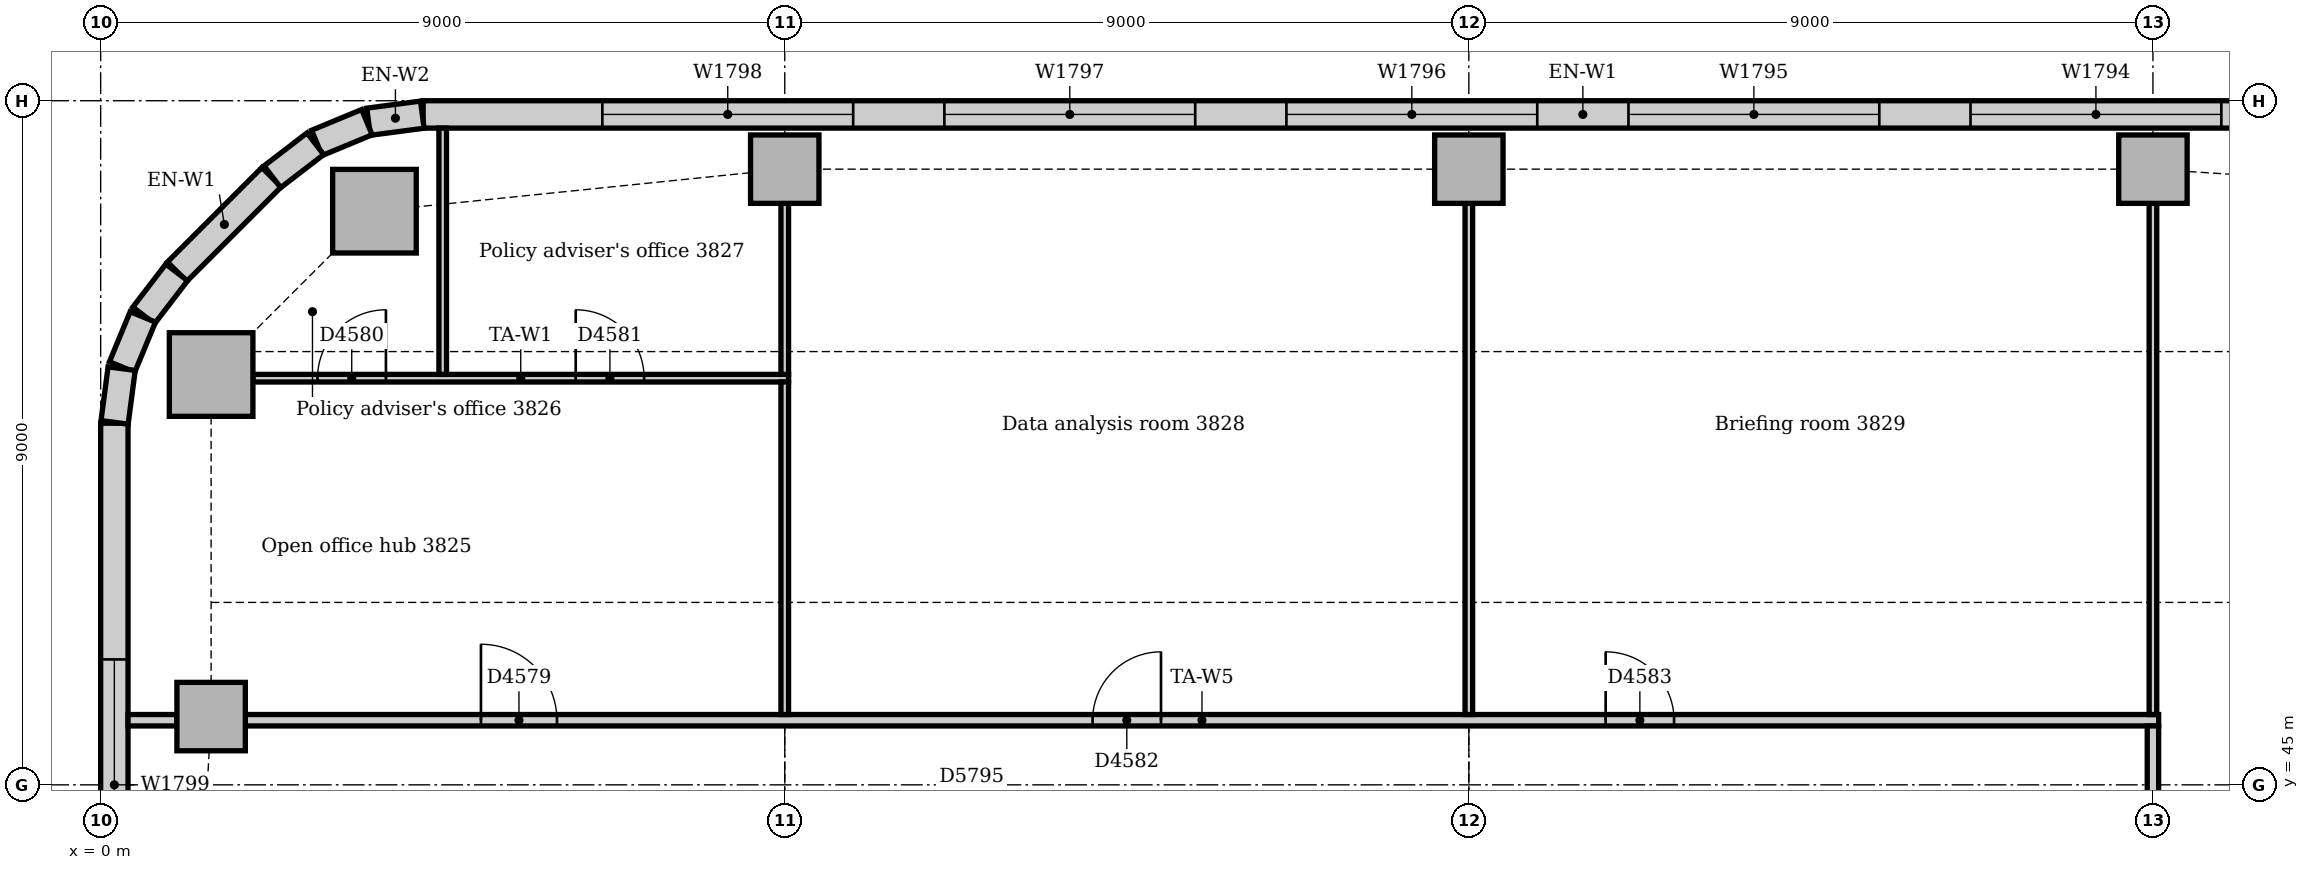
"""IFC4 building model, lengths in metres.
Left out: names, types, materials, properties, quantities, classifications, styles, units other than length and angle.
Written with IfcOpenShell. Run it as: python <this file> out.ifc"""

import sys

from ifc_helpers import new_model, si_unit, direction, frame, frame_2d, origin, origin_2d, place, context, subcontext, project, spatial, rectangle, extrude, element, fill, save


model = new_model("IFC4")
c1 = context("Model", 3, precision=1e-05, world=origin(), true_north=direction((0.0, 1.0)))
c2 = subcontext(c1, "Body", "Model", "MODEL_VIEW")
j1 = project(units=[si_unit("LENGTHUNIT", "METRE"), si_unit("PLANEANGLEUNIT", "RADIAN")], contexts=[c1])
p1 = place(None, origin())
s1 = spatial("IfcSite", under=j1, at=p1, CompositionType="ELEMENT")
p2 = place(p1, origin())
s2 = spatial("IfcBuilding", under=s1, at=p2, CompositionType="ELEMENT")
p3 = place(p2, frame((0.0, 0.0, 161.0)))
s3 = spatial("IfcBuildingStorey", under=s2, at=p3, CompositionType="ELEMENT", Elevation=161.0)
for number, where, z_axis, x_axis in (
    (1, (3.602, 52.547, 0.0), (0.0, 0.0, 1.0), (1.0, 0.0, 0.0)),
    (2, (1.453, 50.398, 0.0), (0.0, 0.0, 1.0), (1.0, 0.0, 0.0)),
):
    element("IfcColumn", number, at=place(p3, frame(where, z_axis=z_axis, x_axis=x_axis)), inside=s3, PredefinedType="COLUMN", context=c2, shape_type="SweptSolid", body=[
        extrude(rectangle(XDim=1.1, YDim=1.1, at=origin_2d()), origin(), (0.0, 0.0, 1.0), 3.85),
    ])
for number, where, z_axis, x_axis in (
    (3, (9.0, 53.1, 0.0), (0.0, 0.0, 1.0), (1.0, 0.0, 0.0)),
    (4, (18.0, 53.1, 0.0), (0.0, 0.0, 1.0), (1.0, 0.0, 0.0)),
    (5, (27.0, 53.1, 0.0), (0.0, 0.0, 1.0), (1.0, 0.0, 0.0)),
    (6, (1.453, 45.898, 0.0), (0.0, 0.0, 1.0), (1.0, 0.0, 0.0)),
):
    element("IfcColumn", number, at=place(p3, frame(where, z_axis=z_axis, x_axis=x_axis)), inside=s3, PredefinedType="COLUMN", context=c2, shape_type="SweptSolid", body=[
        extrude(rectangle(XDim=0.9, YDim=0.9, at=origin_2d()), origin(), (0.0, 0.0, 1.0), 3.85),
    ])
p4 = place(p3, frame((34.757, 53.82, 0.0), z_axis=(0.0, 0.0, 1.0), x_axis=(-1.0, 0.0, 0.0)))
e7 = element("IfcWall", 7, at=p4, inside=s3, PredefinedType="STANDARD", context=c2, shape_type="SweptSolid", body=[
    extrude(rectangle(XDim=30.515, YDim=0.36, at=frame_2d((15.257, 0.0))), origin(), (0.0, 0.0, 1.0), 3.85),
])
p5 = place(p4, frame((2.357, 0.0, 0.9)))
e8 = element("IfcOpeningElement", 8, at=p5, cuts=e7, PredefinedType="OPENING", context=c2, shape_type="SweptSolid", body=[
    extrude(rectangle(XDim=3.3, YDim=1.6, at=frame_2d((1.65, 0.8))), frame((0.0, 0.19, 0.0), z_axis=(0.0, -1.0, 0.0), x_axis=(1.0, 0.0, 0.0)), (0.0, 0.0, 1.0), 0.38),
])
p6 = place(p4, frame((6.857, 0.0, 0.9)))
e9 = element("IfcOpeningElement", 9, at=p6, cuts=e7, PredefinedType="OPENING", context=c2, shape_type="SweptSolid", body=[
    extrude(rectangle(XDim=3.3, YDim=1.6, at=frame_2d((1.65, 0.8))), frame((0.0, 0.19, 0.0), z_axis=(0.0, -1.0, 0.0), x_axis=(1.0, 0.0, 0.0)), (0.0, 0.0, 1.0), 0.38),
])
p7 = place(p4, frame((11.357, 0.0, 0.9)))
e10 = element("IfcOpeningElement", 10, at=p7, cuts=e7, PredefinedType="OPENING", context=c2, shape_type="SweptSolid", body=[
    extrude(rectangle(XDim=3.3, YDim=1.6, at=frame_2d((1.65, 0.8))), frame((0.0, 0.19, 0.0), z_axis=(0.0, -1.0, 0.0), x_axis=(1.0, 0.0, 0.0)), (0.0, 0.0, 1.0), 0.38),
])
p8 = place(p4, frame((15.857, 0.0, 0.9)))
e11 = element("IfcOpeningElement", 11, at=p8, cuts=e7, PredefinedType="OPENING", context=c2, shape_type="SweptSolid", body=[
    extrude(rectangle(XDim=3.3, YDim=1.6, at=frame_2d((1.65, 0.8))), frame((0.0, 0.19, 0.0), z_axis=(0.0, -1.0, 0.0), x_axis=(1.0, 0.0, 0.0)), (0.0, 0.0, 1.0), 0.38),
])
p9 = place(p4, frame((20.357, 0.0, 0.9)))
e12 = element("IfcOpeningElement", 12, at=p9, cuts=e7, PredefinedType="OPENING", context=c2, shape_type="SweptSolid", body=[
    extrude(rectangle(XDim=3.3, YDim=1.6, at=frame_2d((1.65, 0.8))), frame((0.0, 0.19, 0.0), z_axis=(0.0, -1.0, 0.0), x_axis=(1.0, 0.0, 0.0)), (0.0, 0.0, 1.0), 0.38),
])
p10 = place(p4, frame((24.857, 0.0, 0.9)))
e13 = element("IfcOpeningElement", 13, at=p10, cuts=e7, PredefinedType="OPENING", context=c2, shape_type="SweptSolid", body=[
    extrude(rectangle(XDim=3.3, YDim=1.6, at=frame_2d((1.65, 0.8))), frame((0.0, 0.19, 0.0), z_axis=(0.0, -1.0, 0.0), x_axis=(1.0, 0.0, 0.0)), (0.0, 0.0, 1.0), 0.38),
])
p11 = place(p3, frame((2.249, 52.994, 0.0), z_axis=(0.0, 0.0, 1.0), x_axis=(-0.707106781187, -0.707106781187, 0.0)))
e14 = element("IfcWall", 14, at=p11, inside=s3, PredefinedType="STANDARD", context=c2, shape_type="SweptSolid", body=[
    extrude(rectangle(XDim=1.757, YDim=0.36, at=frame_2d((0.879, 0.0))), origin(), (0.0, 0.0, 1.0), 3.85),
])
p12 = place(p3, frame((0.18, 49.757, 0.0), z_axis=(0.0, 0.0, 1.0), x_axis=(0.0, -1.0, 0.0)))
e15 = element("IfcWall", 15, at=p12, inside=s3, PredefinedType="STANDARD", context=c2, shape_type="SweptSolid", body=[
    extrude(rectangle(XDim=7.757, YDim=0.36, at=frame_2d((3.879, 0.0))), origin(), (0.0, 0.0, 1.0), 3.85),
])
p13 = place(p12, frame((3.107, 0.0, 0.9)))
e16 = element("IfcOpeningElement", 16, at=p13, cuts=e15, PredefinedType="OPENING", context=c2, shape_type="SweptSolid", body=[
    extrude(rectangle(XDim=3.3, YDim=1.6, at=frame_2d((1.65, 0.8))), frame((0.0, 0.19, 0.0), z_axis=(0.0, -1.0, 0.0), x_axis=(1.0, 0.0, 0.0)), (0.0, 0.0, 1.0), 0.38),
])
for number, where, z_axis, x_axis in (
    (17, (4.231, 53.817, 0.0), (0.0, 0.0, 1.0), (-0.991, -0.131, 0.0)),
    (18, (3.503, 53.718, 0.0), (0.0, 0.0, 1.0), (-0.924, -0.383, 0.0)),
):
    element("IfcWall", number, at=place(p3, frame(where, z_axis=z_axis, x_axis=x_axis)), inside=s3, PredefinedType="STANDARD", context=c2, shape_type="SweptSolid", body=[
        extrude(rectangle(XDim=0.713, YDim=0.36, at=frame_2d((0.356, 0.0))), origin(), (0.0, 0.0, 1.0), 3.85),
    ])
for number, where, z_axis, x_axis in (
    (19, (2.825, 53.434, 0.0), (0.0, 0.0, 1.0), (-0.793, -0.609, 0.0)),
    (20, (1.0, 51.741, 0.0), (0.0, 0.0, 1.0), (-0.609, -0.793, 0.0)),
):
    element("IfcWall", number, at=place(p3, frame(where, z_axis=z_axis, x_axis=x_axis)), inside=s3, PredefinedType="STANDARD", context=c2, shape_type="SweptSolid", body=[
        extrude(rectangle(XDim=0.713, YDim=0.36, at=frame_2d((0.357, 0.0))), origin(), (0.0, 0.0, 1.0), 3.85),
    ])
for number, where, z_axis, x_axis in (
    (21, (0.555, 51.156, 0.0), (0.0, 0.0, 1.0), (-0.383, -0.924, 0.0)),
    (22, (0.276, 50.476, 0.0), (0.0, 0.0, 1.0), (-0.131, -0.991, 0.0)),
):
    element("IfcWall", number, at=place(p3, frame(where, z_axis=z_axis, x_axis=x_axis)), inside=s3, PredefinedType="STANDARD", context=c2, shape_type="SweptSolid", body=[
        extrude(rectangle(XDim=0.713, YDim=0.36, at=frame_2d((0.356, 0.0))), origin(), (0.0, 0.0, 1.0), 3.85),
    ])
p14 = place(p3, frame((1.903, 45.85, 0.0), z_axis=(0.0, 0.0, 1.0), x_axis=(1.0, 0.0, 0.0)))
e23 = element("IfcWall", 23, at=p14, inside=s3, PredefinedType="PARTITIONING", context=c2, shape_type="SweptSolid", body=[
    extrude(rectangle(XDim=25.172, YDim=0.15, at=frame_2d((12.586, 0.0))), origin(), (0.0, 0.0, 1.0), 3.85),
])
p15 = place(p14, frame((3.1, 0.0, 0.0)))
e24 = element("IfcOpeningElement", 24, at=p15, cuts=e23, PredefinedType="OPENING", context=c2, shape_type="SweptSolid", body=[
    extrude(rectangle(XDim=1.0, YDim=2.1, at=frame_2d((0.5, 1.05))), frame((0.0, 0.085, 0.0), z_axis=(0.0, -1.0, 0.0), x_axis=(1.0, 0.0, 0.0)), (0.0, 0.0, 1.0), 0.17),
])
p16 = place(p14, frame((11.147, 0.0, 0.0)))
e25 = element("IfcOpeningElement", 25, at=p16, cuts=e23, PredefinedType="OPENING", context=c2, shape_type="SweptSolid", body=[
    extrude(rectangle(XDim=0.9, YDim=2.1, at=frame_2d((0.45, 1.05))), frame((0.0, 0.085, 0.0), z_axis=(0.0, -1.0, 0.0), x_axis=(1.0, 0.0, 0.0)), (0.0, 0.0, 1.0), 0.17),
])
p17 = place(p14, frame((17.897, 0.0, 0.0)))
e26 = element("IfcOpeningElement", 26, at=p17, cuts=e23, PredefinedType="OPENING", context=c2, shape_type="SweptSolid", body=[
    extrude(rectangle(XDim=0.9, YDim=2.1, at=frame_2d((0.45, 1.05))), frame((0.0, 0.085, 0.0), z_axis=(0.0, -1.0, 0.0), x_axis=(1.0, 0.0, 0.0)), (0.0, 0.0, 1.0), 0.17),
])
p18 = place(p3, frame((0.36, 45.85, 0.0), z_axis=(0.0, 0.0, 1.0), x_axis=(1.0, 0.0, 0.0)))
e27 = element("IfcWall", 27, at=p18, inside=s3, PredefinedType="PARTITIONING", context=c2, shape_type="SweptSolid", body=[
    extrude(rectangle(XDim=0.643, YDim=0.15, at=frame_2d((0.322, 0.0))), origin(), (0.0, 0.0, 1.0), 3.85),
])
p19 = place(p3, frame((27.0, 44.55, 0.0), z_axis=(0.0, 0.0, 1.0), x_axis=(0.0, 1.0, 0.0)))
e28 = element("IfcWall", 28, at=p19, inside=s3, PredefinedType="PARTITIONING", context=c2, shape_type="SweptSolid", body=[
    extrude(rectangle(XDim=1.225, YDim=0.15, at=frame_2d((0.613, 0.0))), origin(), (0.0, 0.0, 1.0), 3.362),
])
p20 = place(p3, frame((2.003, 50.35, 0.0), z_axis=(0.0, 0.0, 1.0), x_axis=(1.0, 0.0, 0.0)))
e29 = element("IfcWall", 29, at=p20, inside=s3, PredefinedType="PARTITIONING", context=c2, shape_type="SweptSolid", body=[
    extrude(rectangle(XDim=7.047, YDim=0.1, at=frame_2d((3.523, 0.0))), origin(), (0.0, 0.0, 1.0), 3.85),
])
p21 = place(p20, frame((0.85, 0.0, 0.0)))
e30 = element("IfcOpeningElement", 30, at=p21, cuts=e29, PredefinedType="OPENING", context=c2, shape_type="SweptSolid", body=[
    extrude(rectangle(XDim=0.9, YDim=2.1, at=frame_2d((0.45, 1.05))), frame((0.0, 0.06, 0.0), z_axis=(0.0, -1.0, 0.0), x_axis=(1.0, 0.0, 0.0)), (0.0, 0.0, 1.0), 0.12),
])
p22 = place(p20, frame((4.247, 0.0, 0.0)))
e31 = element("IfcOpeningElement", 31, at=p22, cuts=e29, PredefinedType="OPENING", context=c2, shape_type="SweptSolid", body=[
    extrude(rectangle(XDim=0.9, YDim=2.1, at=frame_2d((0.45, 1.05))), frame((0.0, 0.06, 0.0), z_axis=(0.0, -1.0, 0.0), x_axis=(1.0, 0.0, 0.0)), (0.0, 0.0, 1.0), 0.12),
])
p23 = place(p3, frame((9.0, 45.925, 0.0), z_axis=(0.0, 0.0, 1.0), x_axis=(0.0, 1.0, 0.0)))
e32 = element("IfcWall", 32, at=p23, inside=s3, PredefinedType="PARTITIONING", context=c2, shape_type="SweptSolid", body=[
    extrude(rectangle(XDim=4.375, YDim=0.1, at=frame_2d((2.188, 0.0))), origin(), (0.0, 0.0, 1.0), 3.362),
])
p24 = place(p3, frame((9.0, 50.4, 0.0), z_axis=(0.0, 0.0, 1.0), x_axis=(0.0, 1.0, 0.0)))
e33 = element("IfcWall", 33, at=p24, inside=s3, PredefinedType="PARTITIONING", context=c2, shape_type="SweptSolid", body=[
    extrude(rectangle(XDim=2.25, YDim=0.1, at=frame_2d((1.125, 0.0))), origin(), (0.0, 0.0, 1.0), 3.362),
])
for number, where, z_axis, x_axis in (
    (34, (18.0, 45.925, 0.0), (0.0, 0.0, 1.0), (0.0, 1.0, 0.0)),
    (35, (27.0, 45.925, 0.0), (0.0, 0.0, 1.0), (0.0, 1.0, 0.0)),
):
    element("IfcWall", number, at=place(p3, frame(where, z_axis=z_axis, x_axis=x_axis)), inside=s3, PredefinedType="PARTITIONING", context=c2, shape_type="SweptSolid", body=[
        extrude(rectangle(XDim=6.725, YDim=0.1, at=frame_2d((3.362, 0.0))), origin(), (0.0, 0.0, 1.0), 3.362),
    ])
p25 = place(p3, frame((4.5, 50.4, 0.0), z_axis=(0.0, 0.0, 1.0), x_axis=(0.0, 1.0, 0.0)))
e36 = element("IfcWall", 36, at=p25, inside=s3, PredefinedType="PARTITIONING", context=c2, shape_type="SweptSolid", body=[
    extrude(rectangle(XDim=3.24, YDim=0.1, at=frame_2d((1.62, 0.0))), origin(), (0.0, 0.0, 1.0), 3.85),
])
p26 = place(p6, origin())
e37 = element("IfcWindow", 37, at=p26, inside=s3, PartitioningType="SINGLE_PANEL", PredefinedType="WINDOW", context=c2, shape_type="SweptSolid", body=[
    extrude(rectangle(XDim=3.3, YDim=1.6, at=frame_2d((1.65, 0.8))), frame((0.0, 0.13, 0.0), z_axis=(0.0, -1.0, 0.0), x_axis=(1.0, 0.0, 0.0)), (0.0, 0.0, 1.0), 0.06),
])
fill(e9, e37)
p27 = place(p7, origin())
e38 = element("IfcWindow", 38, at=p27, inside=s3, PartitioningType="SINGLE_PANEL", PredefinedType="WINDOW", context=c2, shape_type="SweptSolid", body=[
    extrude(rectangle(XDim=3.3, YDim=1.6, at=frame_2d((1.65, 0.8))), frame((0.0, 0.13, 0.0), z_axis=(0.0, -1.0, 0.0), x_axis=(1.0, 0.0, 0.0)), (0.0, 0.0, 1.0), 0.06),
])
fill(e10, e38)
p28 = place(p8, origin())
e39 = element("IfcWindow", 39, at=p28, inside=s3, PartitioningType="SINGLE_PANEL", PredefinedType="WINDOW", context=c2, shape_type="SweptSolid", body=[
    extrude(rectangle(XDim=3.3, YDim=1.6, at=frame_2d((1.65, 0.8))), frame((0.0, 0.13, 0.0), z_axis=(0.0, -1.0, 0.0), x_axis=(1.0, 0.0, 0.0)), (0.0, 0.0, 1.0), 0.06),
])
fill(e11, e39)
p29 = place(p9, origin())
e40 = element("IfcWindow", 40, at=p29, inside=s3, PartitioningType="SINGLE_PANEL", PredefinedType="WINDOW", context=c2, shape_type="SweptSolid", body=[
    extrude(rectangle(XDim=3.3, YDim=1.6, at=frame_2d((1.65, 0.8))), frame((0.0, 0.13, 0.0), z_axis=(0.0, -1.0, 0.0), x_axis=(1.0, 0.0, 0.0)), (0.0, 0.0, 1.0), 0.06),
])
fill(e12, e40)
p30 = place(p10, origin())
e41 = element("IfcWindow", 41, at=p30, inside=s3, PartitioningType="SINGLE_PANEL", PredefinedType="WINDOW", context=c2, shape_type="SweptSolid", body=[
    extrude(rectangle(XDim=3.3, YDim=1.6, at=frame_2d((1.65, 0.8))), frame((0.0, 0.13, 0.0), z_axis=(0.0, -1.0, 0.0), x_axis=(1.0, 0.0, 0.0)), (0.0, 0.0, 1.0), 0.06),
])
fill(e13, e41)
p31 = place(p13, origin())
e42 = element("IfcWindow", 42, at=p31, inside=s3, PartitioningType="SINGLE_PANEL", PredefinedType="WINDOW", context=c2, shape_type="SweptSolid", body=[
    extrude(rectangle(XDim=3.3, YDim=1.6, at=frame_2d((1.65, 0.8))), frame((0.0, 0.13, 0.0), z_axis=(0.0, -1.0, 0.0), x_axis=(1.0, 0.0, 0.0)), (0.0, 0.0, 1.0), 0.06),
])
fill(e16, e42)
p32 = place(p15, origin())
e43 = element("IfcDoor", 43, at=p32, inside=s3, OperationType="SINGLE_SWING_LEFT", PredefinedType="DOOR", context=c2, shape_type="SweptSolid", body=[
    extrude(rectangle(XDim=1.0, YDim=2.1, at=frame_2d((0.5, 1.05))), frame((0.0, 0.025, 0.0), z_axis=(0.0, -1.0, 0.0), x_axis=(1.0, 0.0, 0.0)), (0.0, 0.0, 1.0), 0.05),
])
fill(e24, e43)
p33 = place(p21, origin())
e44 = element("IfcDoor", 44, at=p33, inside=s3, OperationType="SINGLE_SWING_RIGHT", PredefinedType="DOOR", context=c2, shape_type="SweptSolid", body=[
    extrude(rectangle(XDim=0.9, YDim=2.1, at=frame_2d((0.45, 1.05))), frame((0.0, 0.025, 0.0), z_axis=(0.0, -1.0, 0.0), x_axis=(1.0, 0.0, 0.0)), (0.0, 0.0, 1.0), 0.05),
])
fill(e30, e44)
p34 = place(p22, origin())
e45 = element("IfcDoor", 45, at=p34, inside=s3, OperationType="SINGLE_SWING_LEFT", PredefinedType="DOOR", context=c2, shape_type="SweptSolid", body=[
    extrude(rectangle(XDim=0.9, YDim=2.1, at=frame_2d((0.45, 1.05))), frame((0.0, 0.025, 0.0), z_axis=(0.0, -1.0, 0.0), x_axis=(1.0, 0.0, 0.0)), (0.0, 0.0, 1.0), 0.05),
])
fill(e31, e45)
p35 = place(p16, origin())
e46 = element("IfcDoor", 46, at=p35, inside=s3, OperationType="SINGLE_SWING_RIGHT", PredefinedType="DOOR", context=c2, shape_type="SweptSolid", body=[
    extrude(rectangle(XDim=0.9, YDim=2.1, at=frame_2d((0.45, 1.05))), frame((0.0, 0.025, 0.0), z_axis=(0.0, -1.0, 0.0), x_axis=(1.0, 0.0, 0.0)), (0.0, 0.0, 1.0), 0.05),
])
fill(e25, e46)
p36 = place(p17, origin())
e47 = element("IfcDoor", 47, at=p36, inside=s3, OperationType="SINGLE_SWING_LEFT", PredefinedType="DOOR", context=c2, shape_type="SweptSolid", body=[
    extrude(rectangle(XDim=0.9, YDim=2.1, at=frame_2d((0.45, 1.05))), frame((0.0, 0.025, 0.0), z_axis=(0.0, -1.0, 0.0), x_axis=(1.0, 0.0, 0.0)), (0.0, 0.0, 1.0), 0.05),
])
fill(e26, e47)
save(model, sys.argv[1])
